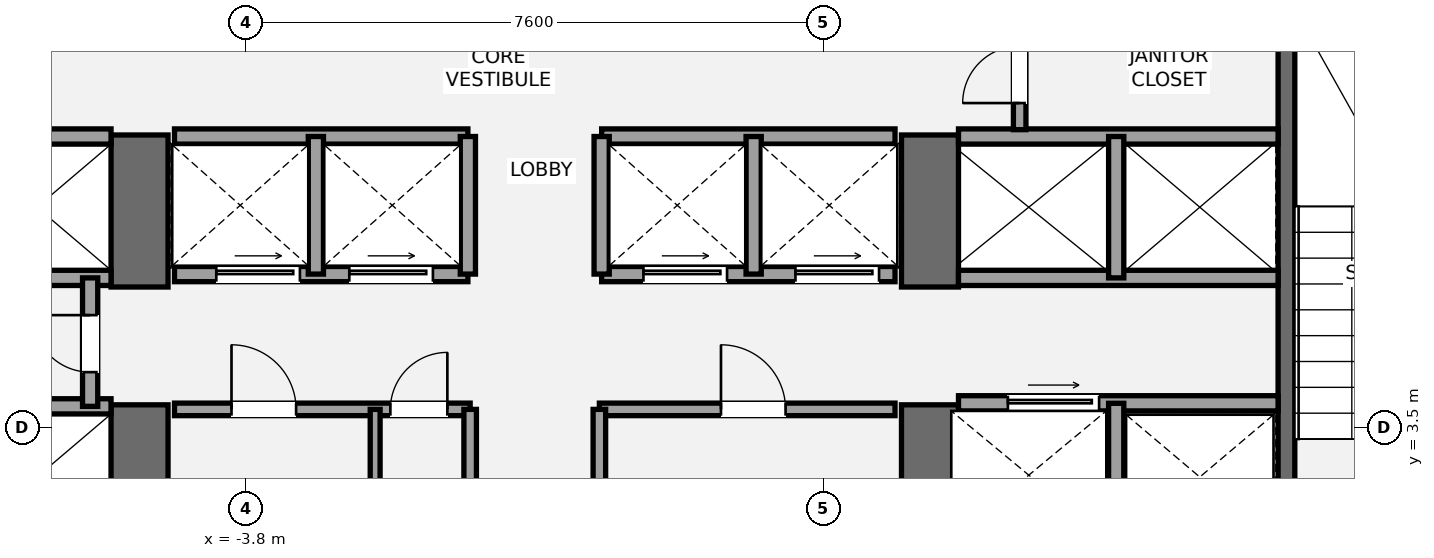
"""IFC4 building model, lengths in metres.
Left out: names, types, materials, properties, quantities, classifications, styles, units other than length and angle.
Written with IfcOpenShell. Run it as: python <this file> out.ifc"""

import sys

from ifc_helpers import new_model, si_unit, direction, frame, frame_2d, origin, place, context, subcontext, project, spatial, rectangle, extrude, element, fill, save


model = new_model("IFC4")
c1 = context("Model", 3, precision=1e-05, world=origin(), true_north=direction((0.0, 1.0)))
c2 = subcontext(c1, "Body", "Model", "MODEL_VIEW")
j1 = project(units=[si_unit("LENGTHUNIT", "METRE"), si_unit("PLANEANGLEUNIT", "RADIAN")], contexts=[c1])
p1 = place(None, origin())
s1 = spatial("IfcSite", under=j1, at=p1, CompositionType="ELEMENT")
p2 = place(p1, origin())
s2 = spatial("IfcBuilding", under=s1, at=p2, CompositionType="ELEMENT")
p3 = place(p2, frame((0.0, 0.0, 114.1)))
s3 = spatial("IfcBuildingStorey", under=s2, at=p3, CompositionType="ELEMENT", Elevation=114.1)
p4 = place(p3, frame((-5.2, 1.1, 0.0), z_axis=(0.0, 0.0, 1.0), x_axis=(0.0, 1.0, 0.0)))
e1 = element("IfcWall", 1, at=p4, inside=s3, PredefinedType="SHEAR", context=c2, shape_type="SweptSolid", body=[
    extrude(rectangle(XDim=2.7, YDim=0.75, at=frame_2d((1.35, 0.0))), origin(), (0.0, 0.0, 1.0), 3.5),
])
p5 = place(p3, frame((-5.2, 5.35, 0.0), z_axis=(0.0, 0.0, 1.0), x_axis=(0.0, 1.0, 0.0)))
e2 = element("IfcWall", 2, at=p5, inside=s3, PredefinedType="SHEAR", context=c2, shape_type="SweptSolid", body=[
    extrude(rectangle(XDim=2.0, YDim=0.75, at=frame_2d((1.0, 0.0))), origin(), (0.0, 0.0, 1.0), 3.5),
])
p6 = place(p3, frame((5.2, 1.1, 0.0), z_axis=(0.0, 0.0, 1.0), x_axis=(0.0, 1.0, 0.0)))
e3 = element("IfcWall", 3, at=p6, inside=s3, PredefinedType="SHEAR", context=c2, shape_type="SweptSolid", body=[
    extrude(rectangle(XDim=2.7, YDim=0.75, at=frame_2d((1.35, 0.0))), origin(), (0.0, 0.0, 1.0), 3.5),
])
p7 = place(p3, frame((5.2, 5.35, 0.0), z_axis=(0.0, 0.0, 1.0), x_axis=(0.0, 1.0, 0.0)))
e4 = element("IfcWall", 4, at=p7, inside=s3, PredefinedType="SHEAR", context=c2, shape_type="SweptSolid", body=[
    extrude(rectangle(XDim=2.0, YDim=0.75, at=frame_2d((1.0, 0.0))), origin(), (0.0, 0.0, 1.0), 3.5),
])
p8 = place(p3, frame((9.89, 1.85, 0.0), z_axis=(0.0, 0.0, 1.0), x_axis=(0.0, 1.0, 0.0)))
e5 = element("IfcWall", 5, at=p8, inside=s3, PredefinedType="SHEAR", context=c2, shape_type="SweptSolid", body=[
    extrude(rectangle(XDim=7.15, YDim=0.22, at=frame_2d((3.575, 0.0))), origin(), (0.0, 0.0, 1.0), 3.5),
])
for number, where, z_axis, x_axis in (
    (6, (-9.78, 3.78, 0.0), (0.0, 0.0, 1.0), (1.0, 0.0, 0.0)),
    (7, (-9.78, 5.47, 0.0), (0.0, 0.0, 1.0), (1.0, 0.0, 0.0)),
    (8, (-9.78, 7.33, 0.0), (0.0, 0.0, 1.0), (1.0, 0.0, 0.0)),
):
    element("IfcWall", number, at=place(p3, frame(where, z_axis=z_axis, x_axis=x_axis)), inside=s3, PredefinedType="SOLIDWALL", context=c2, shape_type="SweptSolid", body=[
        extrude(rectangle(XDim=4.205, YDim=0.2, at=frame_2d((2.103, 0.0))), origin(), (0.0, 0.0, 1.0), 3.31),
    ])
p9 = place(p3, frame((-5.85, 3.78, 0.0), z_axis=(0.0, 0.0, 1.0), x_axis=(0.0, 1.0, 0.0)))
e9 = element("IfcWall", 9, at=p9, inside=s3, PredefinedType="SOLIDWALL", context=c2, shape_type="SweptSolid", body=[
    extrude(rectangle(XDim=1.69, YDim=0.2, at=frame_2d((0.845, 0.0))), origin(), (0.0, 0.0, 1.0), 3.31),
])
p10 = place(p9, frame((0.45, 0.0, 0.0)))
e10 = element("IfcOpeningElement", 10, at=p10, cuts=e9, PredefinedType="OPENING", context=c2, shape_type="SweptSolid", body=[
    extrude(rectangle(XDim=0.75, YDim=2.1, at=frame_2d((0.375, 1.05))), frame((0.0, 0.11, 0.0), z_axis=(0.0, -1.0, 0.0), x_axis=(1.0, 0.0, 0.0)), (0.0, 0.0, 1.0), 0.22),
])
p11 = place(p3, frame((5.575, 3.82, 0.0), z_axis=(0.0, 0.0, 1.0), x_axis=(1.0, 0.0, 0.0)))
e11 = element("IfcWall", 11, at=p11, inside=s3, PredefinedType="SOLIDWALL", context=c2, shape_type="SweptSolid", body=[
    extrude(rectangle(XDim=4.205, YDim=0.2, at=frame_2d((2.103, 0.0))), origin(), (0.0, 0.0, 1.0), 3.31),
])
p12 = place(p11, frame((0.65, 0.0, 0.0)))
e12 = element("IfcOpeningElement", 12, at=p12, cuts=e11, PredefinedType="OPENING", context=c2, shape_type="SweptSolid", body=[
    extrude(rectangle(XDim=1.2, YDim=2.2, at=frame_2d((0.6, 1.1))), frame((0.0, 0.11, 0.0), z_axis=(0.0, -1.0, 0.0), x_axis=(1.0, 0.0, 0.0)), (0.0, 0.0, 1.0), 0.22),
])
p13 = place(p3, frame((7.65, 1.85, 0.0), z_axis=(0.0, 0.0, 1.0), x_axis=(0.0, 1.0, 0.0)))
e13 = element("IfcWall", 13, at=p13, inside=s3, PredefinedType="SOLIDWALL", context=c2, shape_type="SweptSolid", body=[
    extrude(rectangle(XDim=1.97, YDim=0.2, at=frame_2d((0.985, 0.0))), origin(), (0.0, 0.0, 1.0), 3.31),
])
for number, where, z_axis, x_axis in (
    (14, (5.575, 5.47, 0.0), (0.0, 0.0, 1.0), (1.0, 0.0, 0.0)),
    (15, (5.575, 7.33, 0.0), (0.0, 0.0, 1.0), (1.0, 0.0, 0.0)),
):
    element("IfcWall", number, at=place(p3, frame(where, z_axis=z_axis, x_axis=x_axis)), inside=s3, PredefinedType="SOLIDWALL", context=c2, shape_type="SweptSolid", body=[
        extrude(rectangle(XDim=4.205, YDim=0.2, at=frame_2d((2.103, 0.0))), origin(), (0.0, 0.0, 1.0), 3.31),
    ])
p14 = place(p3, frame((7.65, 5.47, 0.0), z_axis=(0.0, 0.0, 1.0), x_axis=(0.0, 1.0, 0.0)))
e16 = element("IfcWall", 16, at=p14, inside=s3, PredefinedType="SOLIDWALL", context=c2, shape_type="SweptSolid", body=[
    extrude(rectangle(XDim=1.86, YDim=0.2, at=frame_2d((0.93, 0.0))), origin(), (0.0, 0.0, 1.0), 3.31),
])
p15 = place(p3, frame((-4.74, 3.74, 0.0), z_axis=(0.0, 0.0, 1.0), x_axis=(1.0, 0.0, 0.0)))
e17 = element("IfcWall", 17, at=p15, inside=s3, PredefinedType="PARTITIONING", context=c2, shape_type="SweptSolid", body=[
    extrude(rectangle(XDim=3.89, YDim=0.165, at=frame_2d((1.945, 0.0))), origin(), (0.0, 0.0, 1.0), 3.31),
])
p16 = place(p15, frame((0.75, 0.0, 0.0)))
e18 = element("IfcOpeningElement", 18, at=p16, cuts=e17, PredefinedType="OPENING", context=c2, shape_type="SweptSolid", body=[
    extrude(rectangle(XDim=0.85, YDim=2.1, at=frame_2d((0.425, 1.05))), frame((0.0, 0.093, 0.0), z_axis=(0.0, -1.0, 0.0), x_axis=(1.0, 0.0, 0.0)), (0.0, 0.0, 1.0), 0.185),
])
p17 = place(p15, frame((2.84, 0.0, 0.0)))
e19 = element("IfcOpeningElement", 19, at=p17, cuts=e17, PredefinedType="OPENING", context=c2, shape_type="SweptSolid", body=[
    extrude(rectangle(XDim=0.75, YDim=2.1, at=frame_2d((0.375, 1.05))), frame((0.0, 0.093, 0.0), z_axis=(0.0, -1.0, 0.0), x_axis=(1.0, 0.0, 0.0)), (0.0, 0.0, 1.0), 0.185),
])
p18 = place(p3, frame((-0.85, 1.92, 0.0), z_axis=(0.0, 0.0, 1.0), x_axis=(0.0, 1.0, 0.0)))
e20 = element("IfcWall", 20, at=p18, inside=s3, PredefinedType="PARTITIONING", context=c2, shape_type="SweptSolid", body=[
    extrude(rectangle(XDim=1.82, YDim=0.165, at=frame_2d((0.91, 0.0))), origin(), (0.0, 0.0, 1.0), 3.31),
])
p19 = place(p3, frame((0.85, 3.74, 0.0), z_axis=(0.0, 0.0, 1.0), x_axis=(1.0, 0.0, 0.0)))
e21 = element("IfcWall", 21, at=p19, inside=s3, PredefinedType="PARTITIONING", context=c2, shape_type="SweptSolid", body=[
    extrude(rectangle(XDim=3.89, YDim=0.165, at=frame_2d((1.945, 0.0))), origin(), (0.0, 0.0, 1.0), 3.31),
])
p20 = place(p19, frame((1.6, 0.0, 0.0)))
e22 = element("IfcOpeningElement", 22, at=p20, cuts=e21, PredefinedType="OPENING", context=c2, shape_type="SweptSolid", body=[
    extrude(rectangle(XDim=0.85, YDim=2.1, at=frame_2d((0.425, 1.05))), frame((0.0, 0.093, 0.0), z_axis=(0.0, -1.0, 0.0), x_axis=(1.0, 0.0, 0.0)), (0.0, 0.0, 1.0), 0.185),
])
p21 = place(p3, frame((0.85, 1.92, 0.0), z_axis=(0.0, 0.0, 1.0), x_axis=(0.0, 1.0, 0.0)))
e23 = element("IfcWall", 23, at=p21, inside=s3, PredefinedType="PARTITIONING", context=c2, shape_type="SweptSolid", body=[
    extrude(rectangle(XDim=1.82, YDim=0.165, at=frame_2d((0.91, 0.0))), origin(), (0.0, 0.0, 1.0), 3.31),
])
p22 = place(p3, frame((-2.1, 1.92, 0.0), z_axis=(0.0, 0.0, 1.0), x_axis=(0.0, 1.0, 0.0)))
e24 = element("IfcWall", 24, at=p22, inside=s3, PredefinedType="PARTITIONING", context=c2, shape_type="SweptSolid", body=[
    extrude(rectangle(XDim=1.82, YDim=0.13, at=frame_2d((0.91, 0.0))), origin(), (0.0, 0.0, 1.0), 3.31),
])
p23 = place(p3, frame((-4.74, 5.52, 0.0), z_axis=(0.0, 0.0, 1.0), x_axis=(1.0, 0.0, 0.0)))
e25 = element("IfcWall", 25, at=p23, inside=s3, PredefinedType="SOLIDWALL", context=c2, shape_type="SweptSolid", body=[
    extrude(rectangle(XDim=3.86, YDim=0.2, at=frame_2d((1.93, 0.0))), origin(), (0.0, 0.0, 1.0), 3.31),
])
p24 = place(p23, frame((0.55, 0.0, 0.0)))
e26 = element("IfcOpeningElement", 26, at=p24, cuts=e25, PredefinedType="OPENING", context=c2, shape_type="SweptSolid", body=[
    extrude(rectangle(XDim=1.1, YDim=2.2, at=frame_2d((0.55, 1.1))), frame((0.0, 0.11, 0.0), z_axis=(0.0, -1.0, 0.0), x_axis=(1.0, 0.0, 0.0)), (0.0, 0.0, 1.0), 0.22),
])
p25 = place(p23, frame((2.3, 0.0, 0.0)))
e27 = element("IfcOpeningElement", 27, at=p25, cuts=e25, PredefinedType="OPENING", context=c2, shape_type="SweptSolid", body=[
    extrude(rectangle(XDim=1.1, YDim=2.2, at=frame_2d((0.55, 1.1))), frame((0.0, 0.11, 0.0), z_axis=(0.0, -1.0, 0.0), x_axis=(1.0, 0.0, 0.0)), (0.0, 0.0, 1.0), 0.22),
])
p26 = place(p3, frame((0.88, 5.52, 0.0), z_axis=(0.0, 0.0, 1.0), x_axis=(1.0, 0.0, 0.0)))
e28 = element("IfcWall", 28, at=p26, inside=s3, PredefinedType="SOLIDWALL", context=c2, shape_type="SweptSolid", body=[
    extrude(rectangle(XDim=3.86, YDim=0.2, at=frame_2d((1.93, 0.0))), origin(), (0.0, 0.0, 1.0), 3.31),
])
p27 = place(p26, frame((0.55, 0.0, 0.0)))
e29 = element("IfcOpeningElement", 29, at=p27, cuts=e28, PredefinedType="OPENING", context=c2, shape_type="SweptSolid", body=[
    extrude(rectangle(XDim=1.1, YDim=2.2, at=frame_2d((0.55, 1.1))), frame((0.0, 0.11, 0.0), z_axis=(0.0, -1.0, 0.0), x_axis=(1.0, 0.0, 0.0)), (0.0, 0.0, 1.0), 0.22),
])
p28 = place(p26, frame((2.55, 0.0, 0.0)))
e30 = element("IfcOpeningElement", 30, at=p28, cuts=e28, PredefinedType="OPENING", context=c2, shape_type="SweptSolid", body=[
    extrude(rectangle(XDim=1.1, YDim=2.2, at=frame_2d((0.55, 1.1))), frame((0.0, 0.11, 0.0), z_axis=(0.0, -1.0, 0.0), x_axis=(1.0, 0.0, 0.0)), (0.0, 0.0, 1.0), 0.22),
])
for number, where, z_axis, x_axis in (
    (31, (-4.74, 7.33, 0.0), (0.0, 0.0, 1.0), (1.0, 0.0, 0.0)),
    (32, (0.88, 7.33, 0.0), (0.0, 0.0, 1.0), (1.0, 0.0, 0.0)),
):
    element("IfcWall", number, at=place(p3, frame(where, z_axis=z_axis, x_axis=x_axis)), inside=s3, PredefinedType="SOLIDWALL", context=c2, shape_type="SweptSolid", body=[
        extrude(rectangle(XDim=3.86, YDim=0.2, at=frame_2d((1.93, 0.0))), origin(), (0.0, 0.0, 1.0), 3.31),
    ])
for number, where, z_axis, x_axis in (
    (33, (-2.88, 5.52, 0.0), (0.0, 0.0, 1.0), (0.0, 1.0, 0.0)),
    (34, (2.88, 5.52, 0.0), (0.0, 0.0, 1.0), (0.0, 1.0, 0.0)),
    (35, (-0.88, 5.52, 0.0), (0.0, 0.0, 1.0), (0.0, 1.0, 0.0)),
    (36, (0.88, 5.52, 0.0), (0.0, 0.0, 1.0), (0.0, 1.0, 0.0)),
):
    element("IfcWall", number, at=place(p3, frame(where, z_axis=z_axis, x_axis=x_axis)), inside=s3, PredefinedType="SOLIDWALL", context=c2, shape_type="SweptSolid", body=[
        extrude(rectangle(XDim=1.81, YDim=0.2, at=frame_2d((0.905, 0.0))), origin(), (0.0, 0.0, 1.0), 3.31),
    ])
p29 = place(p3, frame((6.38, 7.42, 0.0), z_axis=(0.0, 0.0, 1.0), x_axis=(0.0, 1.0, 0.0)))
e37 = element("IfcWall", 37, at=p29, inside=s3, PredefinedType="PARTITIONING", context=c2, shape_type="SweptSolid", body=[
    extrude(rectangle(XDim=1.58, YDim=0.165, at=frame_2d((0.79, 0.0))), origin(), (0.0, 0.0, 1.0), 3.31),
])
p30 = place(p29, frame((0.35, 0.0, 0.0)))
e38 = element("IfcOpeningElement", 38, at=p30, cuts=e37, PredefinedType="OPENING", context=c2, shape_type="SweptSolid", body=[
    extrude(rectangle(XDim=0.75, YDim=2.1, at=frame_2d((0.375, 1.05))), frame((0.0, 0.093, 0.0), z_axis=(0.0, -1.0, 0.0), x_axis=(1.0, 0.0, 0.0)), (0.0, 0.0, 1.0), 0.185),
])
p31 = place(p10, origin())
e39 = element("IfcDoor", 39, at=p31, inside=s3, OperationType="SINGLE_SWING_RIGHT", PredefinedType="DOOR", context=c2, shape_type="SweptSolid", body=[
    extrude(rectangle(XDim=0.75, YDim=2.1, at=frame_2d((0.375, 1.05))), frame((0.0, 0.025, 0.0), z_axis=(0.0, -1.0, 0.0), x_axis=(1.0, 0.0, 0.0)), (0.0, 0.0, 1.0), 0.05),
])
fill(e10, e39)
p32 = place(p12, origin())
e40 = element("IfcDoor", 40, at=p32, inside=s3, OperationType="SLIDING_TO_RIGHT", PredefinedType="DOOR", context=c2, shape_type="SweptSolid", body=[
    extrude(rectangle(XDim=1.2, YDim=2.2, at=frame_2d((0.6, 1.1))), frame((0.0, 0.025, 0.0), z_axis=(0.0, -1.0, 0.0), x_axis=(1.0, 0.0, 0.0)), (0.0, 0.0, 1.0), 0.05),
])
fill(e12, e40)
p33 = place(p16, origin())
e41 = element("IfcDoor", 41, at=p33, inside=s3, OperationType="SINGLE_SWING_LEFT", PredefinedType="DOOR", context=c2, shape_type="SweptSolid", body=[
    extrude(rectangle(XDim=0.85, YDim=2.1, at=frame_2d((0.425, 1.05))), frame((0.0, 0.025, 0.0), z_axis=(0.0, -1.0, 0.0), x_axis=(1.0, 0.0, 0.0)), (0.0, 0.0, 1.0), 0.05),
])
fill(e18, e41)
p34 = place(p17, origin())
e42 = element("IfcDoor", 42, at=p34, inside=s3, OperationType="SINGLE_SWING_RIGHT", PredefinedType="DOOR", context=c2, shape_type="SweptSolid", body=[
    extrude(rectangle(XDim=0.75, YDim=2.1, at=frame_2d((0.375, 1.05))), frame((0.0, 0.025, 0.0), z_axis=(0.0, -1.0, 0.0), x_axis=(1.0, 0.0, 0.0)), (0.0, 0.0, 1.0), 0.05),
])
fill(e19, e42)
p35 = place(p20, origin())
e43 = element("IfcDoor", 43, at=p35, inside=s3, OperationType="SINGLE_SWING_LEFT", PredefinedType="DOOR", context=c2, shape_type="SweptSolid", body=[
    extrude(rectangle(XDim=0.85, YDim=2.1, at=frame_2d((0.425, 1.05))), frame((0.0, 0.025, 0.0), z_axis=(0.0, -1.0, 0.0), x_axis=(1.0, 0.0, 0.0)), (0.0, 0.0, 1.0), 0.05),
])
fill(e22, e43)
p36 = place(p24, origin())
e44 = element("IfcDoor", 44, at=p36, inside=s3, OperationType="SLIDING_TO_LEFT", PredefinedType="DOOR", context=c2, shape_type="SweptSolid", body=[
    extrude(rectangle(XDim=1.1, YDim=2.2, at=frame_2d((0.55, 1.1))), frame((0.0, 0.025, 0.0), z_axis=(0.0, -1.0, 0.0), x_axis=(1.0, 0.0, 0.0)), (0.0, 0.0, 1.0), 0.05),
])
fill(e26, e44)
p37 = place(p25, origin())
e45 = element("IfcDoor", 45, at=p37, inside=s3, OperationType="SLIDING_TO_LEFT", PredefinedType="DOOR", context=c2, shape_type="SweptSolid", body=[
    extrude(rectangle(XDim=1.1, YDim=2.2, at=frame_2d((0.55, 1.1))), frame((0.0, 0.025, 0.0), z_axis=(0.0, -1.0, 0.0), x_axis=(1.0, 0.0, 0.0)), (0.0, 0.0, 1.0), 0.05),
])
fill(e27, e45)
p38 = place(p27, origin())
e46 = element("IfcDoor", 46, at=p38, inside=s3, OperationType="SLIDING_TO_LEFT", PredefinedType="DOOR", context=c2, shape_type="SweptSolid", body=[
    extrude(rectangle(XDim=1.1, YDim=2.2, at=frame_2d((0.55, 1.1))), frame((0.0, 0.025, 0.0), z_axis=(0.0, -1.0, 0.0), x_axis=(1.0, 0.0, 0.0)), (0.0, 0.0, 1.0), 0.05),
])
fill(e29, e46)
p39 = place(p28, origin())
e47 = element("IfcDoor", 47, at=p39, inside=s3, OperationType="SLIDING_TO_LEFT", PredefinedType="DOOR", context=c2, shape_type="SweptSolid", body=[
    extrude(rectangle(XDim=1.1, YDim=2.2, at=frame_2d((0.55, 1.1))), frame((0.0, 0.025, 0.0), z_axis=(0.0, -1.0, 0.0), x_axis=(1.0, 0.0, 0.0)), (0.0, 0.0, 1.0), 0.05),
])
fill(e30, e47)
p40 = place(p30, origin())
e48 = element("IfcDoor", 48, at=p40, inside=s3, OperationType="SINGLE_SWING_LEFT", PredefinedType="DOOR", context=c2, shape_type="SweptSolid", body=[
    extrude(rectangle(XDim=0.75, YDim=2.1, at=frame_2d((0.375, 1.05))), frame((0.0, 0.025, 0.0), z_axis=(0.0, -1.0, 0.0), x_axis=(1.0, 0.0, 0.0)), (0.0, 0.0, 1.0), 0.05),
])
fill(e38, e48)
save(model, sys.argv[1])
